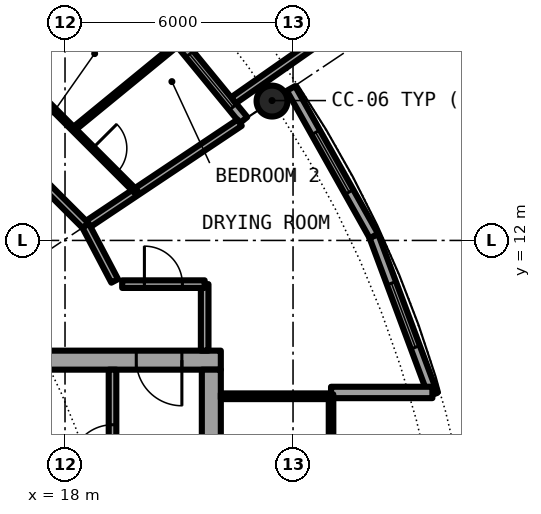
"""IFC4 building model, lengths in metres.
Left out: names, types, materials, properties, quantities, classifications, styles, units other than length and angle.
Written with IfcOpenShell. Run it as: python <this file> out.ifc"""

import sys

from ifc_helpers import new_model, si_unit, direction, frame, frame_2d, origin, origin_2d, place, context, subcontext, project, spatial, rectangle, hollow_circle, extrude, element, fill, save


model = new_model("IFC4")
c1 = context("Model", 3, precision=1e-05, world=origin(), true_north=direction((0.0, 1.0)))
c2 = subcontext(c1, "Body", "Model", "MODEL_VIEW")
j1 = project(units=[si_unit("LENGTHUNIT", "METRE"), si_unit("PLANEANGLEUNIT", "RADIAN")], contexts=[c1])
p1 = place(None, origin())
s1 = spatial("IfcSite", under=j1, at=p1, CompositionType="ELEMENT")
p2 = place(p1, origin())
s2 = spatial("IfcBuilding", under=s1, at=p2, CompositionType="ELEMENT")
p3 = place(p2, frame((0.0, 0.0, 167.7)))
s3 = spatial("IfcBuildingStorey", under=s2, at=p3, CompositionType="ELEMENT", Elevation=167.7)
p4 = place(p3, frame((23.448, 15.667, 0.0), z_axis=(0.0, 0.0, 1.0), x_axis=(1.0, 0.0, 0.0)))
e1 = element("IfcColumn", 1, at=p4, inside=s3, PredefinedType="COLUMN", context=c2, shape_type="SweptSolid", body=[
    extrude(hollow_circle(Radius=0.406, WallThickness=0.04, at=origin_2d()), origin(), (0.0, 0.0, 1.0), 3.05),
])
p5 = place(p3, frame((22.699, 15.167, 0.0), z_axis=(0.0, 0.0, 1.0), x_axis=(-0.634382322723, 0.773019449054, 0.0)))
e2 = element("IfcWall", 2, at=p5, inside=s3, PredefinedType="SOLIDWALL", context=c2, shape_type="SweptSolid", body=[
    extrude(rectangle(XDim=5.352, YDim=0.25, at=frame_2d((2.676, 0.0))), origin(), (0.0, 0.0, 1.0), 2.7),
])
p6 = place(p5, frame((0.441, 0.0, 0.3)))
e3 = element("IfcOpeningElement", 3, at=p6, cuts=e2, PredefinedType="OPENING", context=c2, shape_type="SweptSolid", body=[
    extrude(rectangle(XDim=1.8, YDim=2.1, at=frame_2d((0.9, 1.05))), frame((0.0, 0.135, 0.0), z_axis=(0.0, -1.0, 0.0), x_axis=(1.0, 0.0, 0.0)), (0.0, 0.0, 1.0), 0.27),
])
p7 = place(p5, frame((3.51, 0.0, 0.0)))
e4 = element("IfcOpeningElement", 4, at=p7, cuts=e2, PredefinedType="OPENING", context=c2, shape_type="SweptSolid", body=[
    extrude(rectangle(XDim=1.0, YDim=2.2, at=frame_2d((0.5, 1.1))), frame((0.0, 0.135, 0.0), z_axis=(0.0, -1.0, 0.0), x_axis=(1.0, 0.0, 0.0)), (0.0, 0.0, 1.0), 0.27),
])
p8 = place(p3, frame((22.433, 15.688, -0.03), z_axis=(0.0, 0.0, 1.0), x_axis=(0.819373043115, 0.573260687834, 0.0)))
e5 = element("IfcWall", 5, at=p8, inside=s3, PredefinedType="SOLIDWALL", context=c2, shape_type="SweptSolid", body=[
    extrude(rectangle(XDim=2.925, YDim=0.2, at=frame_2d((1.463, 0.0))), origin(), (0.0, 0.0, 1.0), 2.73),
])
p9 = place(p3, frame((27.682, 7.945, 0.0), z_axis=(0.0, 0.0, 1.0), x_axis=(-0.349247811493, 0.937030397675, 0.0)))
e6 = element("IfcWall", 6, at=p9, inside=s3, PredefinedType="SOLIDWALL", context=c2, shape_type="SweptSolid", body=[
    extrude(rectangle(XDim=4.452, YDim=0.25, at=frame_2d((2.226, 0.0))), origin(), (0.0, 0.0, 1.0), 2.7),
])
p10 = place(p9, frame((1.327, 0.0, 0.3)))
e7 = element("IfcOpeningElement", 7, at=p10, cuts=e6, PredefinedType="OPENING", context=c2, shape_type="SweptSolid", body=[
    extrude(rectangle(XDim=1.8, YDim=2.1, at=frame_2d((0.9, 1.05))), frame((0.0, 0.135, 0.0), z_axis=(0.0, -1.0, 0.0), x_axis=(1.0, 0.0, 0.0)), (0.0, 0.0, 1.0), 0.27),
])
p11 = place(p3, frame((26.127, 12.117, 0.0), z_axis=(0.0, 0.0, 1.0), x_axis=(-0.489696356642, 0.871893042919, 0.0)))
e8 = element("IfcWall", 8, at=p11, inside=s3, PredefinedType="SOLIDWALL", context=c2, shape_type="SweptSolid", body=[
    extrude(rectangle(XDim=4.454, YDim=0.25, at=frame_2d((2.227, 0.0))), origin(), (0.0, 0.0, 1.0), 2.7),
])
p12 = place(p11, frame((1.327, 0.0, 0.3)))
e9 = element("IfcOpeningElement", 9, at=p12, cuts=e8, PredefinedType="OPENING", context=c2, shape_type="SweptSolid", body=[
    extrude(rectangle(XDim=1.8, YDim=2.1, at=frame_2d((0.9, 1.05))), frame((0.0, 0.135, 0.0), z_axis=(0.0, -1.0, 0.0), x_axis=(1.0, 0.0, 0.0)), (0.0, 0.0, 1.0), 0.27),
])
p13 = place(p3, frame((25.0, 8.0, 0.0), z_axis=(0.0, 0.0, 1.0), x_axis=(1.0, 0.0, 0.0)))
e10 = element("IfcWall", 10, at=p13, inside=s3, PredefinedType="SOLIDWALL", context=c2, shape_type="SweptSolid", body=[
    extrude(rectangle(XDim=2.667, YDim=0.3, at=frame_2d((1.333, 0.0))), origin(), (0.0, 0.0, 1.0), 2.7),
])
p14 = place(p3, frame((22.1, 8.85, 0.0), z_axis=(0.0, 0.0, 1.0), x_axis=(-1.0, 0.0, 0.0)))
e11 = element("IfcWall", 11, at=p14, inside=s3, PredefinedType="SHEAR", context=c2, shape_type="SweptSolid", body=[
    extrude(rectangle(XDim=13.6, YDim=0.5, at=frame_2d((6.8, 0.0))), origin(), (0.0, 0.0, 1.0), 3.05),
])
p15 = place(p14, frame((1.025, 0.0, 0.0)))
e12 = element("IfcOpeningElement", 12, at=p15, cuts=e11, PredefinedType="OPENING", context=c2, shape_type="SweptSolid", body=[
    extrude(rectangle(XDim=1.2, YDim=2.3, at=frame_2d((0.6, 1.15))), frame((0.0, 0.26, 0.0), z_axis=(0.0, -1.0, 0.0), x_axis=(1.0, 0.0, 0.0)), (0.0, 0.0, 1.0), 0.52),
])
p16 = place(p3, frame((21.85, 8.6, 0.0), z_axis=(0.0, 0.0, 1.0), x_axis=(0.0, -1.0, 0.0)))
e13 = element("IfcWall", 13, at=p16, inside=s3, PredefinedType="SHEAR", context=c2, shape_type="SweptSolid", body=[
    extrude(rectangle(XDim=17.2, YDim=0.5, at=frame_2d((8.6, 0.0))), origin(), (0.0, 0.0, 1.0), 3.05),
])
p17 = place(p16, frame((7.7, 0.0, 0.0)))
e14 = element("IfcOpeningElement", 14, at=p17, cuts=e13, PredefinedType="OPENING", context=c2, shape_type="SweptSolid", body=[
    extrude(rectangle(XDim=1.8, YDim=2.3, at=frame_2d((0.9, 1.15))), frame((0.0, 0.26, 0.0), z_axis=(0.0, -1.0, 0.0), x_axis=(1.0, 0.0, 0.0)), (0.0, 0.0, 1.0), 0.52),
])
p18 = place(p3, frame((19.25, 1.575, 0.0), z_axis=(0.0, 0.0, 1.0), x_axis=(0.0, 1.0, 0.0)))
e15 = element("IfcWall", 15, at=p18, inside=s3, PredefinedType="SOLIDWALL", context=c2, shape_type="SweptSolid", body=[
    extrude(rectangle(XDim=7.025, YDim=0.2, at=frame_2d((3.513, 0.0))), origin(), (0.0, 0.0, 1.0), 2.7),
])
p19 = place(p18, frame((4.475, 0.0, 0.0)))
e16 = element("IfcOpeningElement", 16, at=p19, cuts=e15, PredefinedType="OPENING", context=c2, shape_type="SweptSolid", body=[
    extrude(rectangle(XDim=1.1, YDim=2.3, at=frame_2d((0.55, 1.15))), frame((0.0, 0.11, 0.0), z_axis=(0.0, -1.0, 0.0), x_axis=(1.0, 0.0, 0.0)), (0.0, 0.0, 1.0), 0.22),
])
p20 = place(p3, frame((22.1, 7.9, 0.0), z_axis=(0.0, 0.0, 1.0), x_axis=(1.0, 0.0, 0.0)))
e17 = element("IfcWall", 17, at=p20, inside=s3, PredefinedType="PARTITIONING", context=c2, shape_type="SweptSolid", body=[
    extrude(rectangle(XDim=2.84, YDim=0.15, at=frame_2d((1.42, 0.0))), origin(), (0.0, 0.0, 1.0), 2.7),
])
p21 = place(p3, frame((25.0, -7.95, 0.0), z_axis=(0.0, 0.0, 1.0), x_axis=(0.0, 1.0, 0.0)))
e18 = element("IfcWall", 18, at=p21, inside=s3, PredefinedType="PARTITIONING", context=c2, shape_type="SweptSolid", body=[
    extrude(rectangle(XDim=15.9, YDim=0.12, at=frame_2d((7.95, 0.0))), origin(), (0.0, 0.0, 1.0), 2.7),
])
p22 = place(p21, frame((0.95, 0.0, 0.1)))
e19 = element("IfcOpeningElement", 19, at=p22, cuts=e18, PredefinedType="OPENING", context=c2, shape_type="SweptSolid", body=[
    extrude(rectangle(XDim=14.0, YDim=2.35, at=frame_2d((7.0, 1.175))), frame((0.0, 0.07, 0.0), z_axis=(0.0, -1.0, 0.0), x_axis=(1.0, 0.0, 0.0)), (0.0, 0.0, 1.0), 0.14),
])
p23 = place(p3, frame((21.675, 9.1, 0.0), z_axis=(0.0, 0.0, 1.0), x_axis=(0.0, 1.0, 0.0)))
e20 = element("IfcWall", 20, at=p23, inside=s3, PredefinedType="PARTITIONING", context=c2, shape_type="SweptSolid", body=[
    extrude(rectangle(XDim=1.75, YDim=0.2, at=frame_2d((0.875, 0.0))), origin(), (0.0, 0.0, 1.0), 2.7),
])
p24 = place(p3, frame((16.575, 16.575, 0.0), z_axis=(0.0, 0.0, 1.0), x_axis=(0.707106781187, 0.707106781187, 0.0)))
e21 = element("IfcWall", 21, at=p24, inside=s3, PredefinedType="PARTITIONING", context=c2, shape_type="SweptSolid", body=[
    extrude(rectangle(XDim=3.735, YDim=0.1, at=frame_2d((1.868, 0.0))), origin(), (0.0, 0.0, 1.0), 2.7),
])
p25 = place(p24, frame((1.417, 0.0, 0.0)))
e22 = element("IfcOpeningElement", 22, at=p25, cuts=e21, PredefinedType="OPENING", context=c2, shape_type="SweptSolid", body=[
    extrude(rectangle(XDim=0.9, YDim=2.3, at=frame_2d((0.45, 1.15))), frame((0.0, 0.06, 0.0), z_axis=(0.0, -1.0, 0.0), x_axis=(1.0, 0.0, 0.0)), (0.0, 0.0, 1.0), 0.12),
])
p26 = place(p3, frame((18.224, 14.927, 0.0), z_axis=(0.0, 0.0, 1.0), x_axis=(0.773548271597, 0.633737383709, 0.0)))
e23 = element("IfcWall", 23, at=p26, inside=s3, PredefinedType="PARTITIONING", context=c2, shape_type="SweptSolid", body=[
    extrude(rectangle(XDim=3.618, YDim=0.1, at=frame_2d((1.809, 0.0))), origin(), (0.0, 0.0, 1.0), 2.7),
])
p27 = place(p3, frame((18.542, 12.389, 0.0), z_axis=(0.0, 0.0, 1.0), x_axis=(0.831387096605, 0.55569370664, 0.0)))
e24 = element("IfcWall", 24, at=p27, inside=s3, PredefinedType="PARTITIONING", context=c2, shape_type="SweptSolid", body=[
    extrude(rectangle(XDim=4.875, YDim=0.2, at=frame_2d((2.438, 0.0))), origin(), (0.0, 0.0, 1.0), 2.7),
])
p28 = place(p3, frame((19.504, 10.85, 0.0), z_axis=(0.0, 0.0, 1.0), x_axis=(1.0, 0.0, 0.0)))
e25 = element("IfcWall", 25, at=p28, inside=s3, PredefinedType="PARTITIONING", context=c2, shape_type="SweptSolid", body=[
    extrude(rectangle(XDim=2.171, YDim=0.2, at=frame_2d((1.085, 0.0))), origin(), (0.0, 0.0, 1.0), 2.7),
])
p29 = place(p28, frame((0.585, 0.0, 0.0)))
e26 = element("IfcOpeningElement", 26, at=p29, cuts=e25, PredefinedType="OPENING", context=c2, shape_type="SweptSolid", body=[
    extrude(rectangle(XDim=1.0, YDim=2.3, at=frame_2d((0.5, 1.15))), frame((0.0, 0.11, 0.0), z_axis=(0.0, -1.0, 0.0), x_axis=(1.0, 0.0, 0.0)), (0.0, 0.0, 1.0), 0.22),
])
p30 = place(p3, frame((12.389, 18.542, 0.0), z_axis=(0.0, 0.0, 1.0), x_axis=(0.707106781187, -0.707106781187, 0.0)))
e27 = element("IfcWall", 27, at=p30, inside=s3, PredefinedType="PARTITIONING", context=c2, shape_type="SweptSolid", body=[
    extrude(rectangle(XDim=8.702, YDim=0.2, at=frame_2d((4.351, 0.0))), origin(), (0.0, 0.0, 1.0), 2.7),
])
p31 = place(p30, frame((4.938, 0.0, 0.0)))
e28 = element("IfcOpeningElement", 28, at=p31, cuts=e27, PredefinedType="OPENING", context=c2, shape_type="SweptSolid", body=[
    extrude(rectangle(XDim=1.0, YDim=2.3, at=frame_2d((0.5, 1.15))), frame((0.0, 0.11, 0.0), z_axis=(0.0, -1.0, 0.0), x_axis=(1.0, 0.0, 0.0)), (0.0, 0.0, 1.0), 0.22),
])
p32 = place(p3, frame((18.542, 12.389, 0.0), z_axis=(0.0, 0.0, 1.0), x_axis=(0.465605550524, -0.884992356646, 0.0)))
e29 = element("IfcWall", 29, at=p32, inside=s3, PredefinedType="PARTITIONING", context=c2, shape_type="SweptSolid", body=[
    extrude(rectangle(XDim=1.643, YDim=0.2, at=frame_2d((0.821, 0.0))), origin(), (0.0, 0.0, 1.0), 2.7),
])
p33 = place(p3, frame((16.575, 16.575, 0.0), z_axis=(0.0, 0.0, 1.0), x_axis=(0.707132961115, -0.707080600289, 0.0)))
e30 = element("IfcWall", 30, at=p33, inside=s3, PredefinedType="PARTITIONING", context=c2, shape_type="SweptSolid", body=[
    extrude(rectangle(XDim=4.663, YDim=0.1, at=frame_2d((2.331, 0.0))), origin(), (0.0, 0.0, 1.0), 2.7),
])
p34 = place(p33, frame((3.043, 0.0, 0.0)))
e31 = element("IfcOpeningElement", 31, at=p34, cuts=e30, PredefinedType="OPENING", context=c2, shape_type="SweptSolid", body=[
    extrude(rectangle(XDim=0.9, YDim=2.3, at=frame_2d((0.45, 1.15))), frame((0.0, 0.06, 0.0), z_axis=(0.0, -1.0, 0.0), x_axis=(1.0, 0.0, 0.0)), (0.0, 0.0, 1.0), 0.12),
])
p35 = place(p6, origin())
e32 = element("IfcWindow", 32, at=p35, inside=s3, PartitioningType="SINGLE_PANEL", PredefinedType="WINDOW", context=c2, shape_type="SweptSolid", body=[
    extrude(rectangle(XDim=1.8, YDim=2.1, at=frame_2d((0.9, 1.05))), frame((0.0, 0.03, 0.0), z_axis=(0.0, -1.0, 0.0), x_axis=(1.0, 0.0, 0.0)), (0.0, 0.0, 1.0), 0.06),
])
fill(e3, e32)
p36 = place(p10, origin())
e33 = element("IfcWindow", 33, at=p36, inside=s3, PartitioningType="SINGLE_PANEL", PredefinedType="WINDOW", context=c2, shape_type="SweptSolid", body=[
    extrude(rectangle(XDim=1.8, YDim=2.1, at=frame_2d((0.9, 1.05))), frame((0.0, 0.03, 0.0), z_axis=(0.0, -1.0, 0.0), x_axis=(1.0, 0.0, 0.0)), (0.0, 0.0, 1.0), 0.06),
])
fill(e7, e33)
p37 = place(p12, origin())
e34 = element("IfcWindow", 34, at=p37, inside=s3, PartitioningType="SINGLE_PANEL", PredefinedType="WINDOW", context=c2, shape_type="SweptSolid", body=[
    extrude(rectangle(XDim=1.8, YDim=2.1, at=frame_2d((0.9, 1.05))), frame((0.0, 0.03, 0.0), z_axis=(0.0, -1.0, 0.0), x_axis=(1.0, 0.0, 0.0)), (0.0, 0.0, 1.0), 0.06),
])
fill(e9, e34)
p38 = place(p19, origin())
e35 = element("IfcDoor", 35, at=p38, inside=s3, OperationType="SINGLE_SWING_LEFT", PredefinedType="DOOR", context=c2, shape_type="SweptSolid", body=[
    extrude(rectangle(XDim=1.1, YDim=2.3, at=frame_2d((0.55, 1.15))), frame((0.0, 0.025, 0.0), z_axis=(0.0, -1.0, 0.0), x_axis=(1.0, 0.0, 0.0)), (0.0, 0.0, 1.0), 0.05),
])
fill(e16, e35)
p39 = place(p15, origin())
e36 = element("IfcDoor", 36, at=p39, inside=s3, OperationType="SINGLE_SWING_RIGHT", PredefinedType="DOOR", context=c2, shape_type="SweptSolid", body=[
    extrude(rectangle(XDim=1.2, YDim=2.3, at=frame_2d((0.6, 1.15))), frame((0.0, 0.025, 0.0), z_axis=(0.0, -1.0, 0.0), x_axis=(1.0, 0.0, 0.0)), (0.0, 0.0, 1.0), 0.05),
])
fill(e12, e36)
p40 = place(p22, origin())
e37 = element("IfcWindow", 37, at=p40, inside=s3, PartitioningType="SINGLE_PANEL", PredefinedType="WINDOW", context=c2, shape_type="SweptSolid", body=[
    extrude(rectangle(XDim=14.0, YDim=2.35, at=frame_2d((7.0, 1.175))), frame((0.0, 0.03, 0.0), z_axis=(0.0, -1.0, 0.0), x_axis=(1.0, 0.0, 0.0)), (0.0, 0.0, 1.0), 0.06),
])
fill(e19, e37)
p41 = place(p34, origin())
e38 = element("IfcDoor", 38, at=p41, inside=s3, OperationType="SINGLE_SWING_RIGHT", PredefinedType="DOOR", context=c2, shape_type="SweptSolid", body=[
    extrude(rectangle(XDim=0.9, YDim=2.3, at=frame_2d((0.45, 1.15))), frame((0.0, 0.025, 0.0), z_axis=(0.0, -1.0, 0.0), x_axis=(1.0, 0.0, 0.0)), (0.0, 0.0, 1.0), 0.05),
])
fill(e31, e38)
p42 = place(p29, origin())
e39 = element("IfcDoor", 39, at=p42, inside=s3, OperationType="SINGLE_SWING_LEFT", PredefinedType="DOOR", context=c2, shape_type="SweptSolid", body=[
    extrude(rectangle(XDim=1.0, YDim=2.3, at=frame_2d((0.5, 1.15))), frame((0.0, 0.025, 0.0), z_axis=(0.0, -1.0, 0.0), x_axis=(1.0, 0.0, 0.0)), (0.0, 0.0, 1.0), 0.05),
])
fill(e26, e39)
save(model, sys.argv[1])
